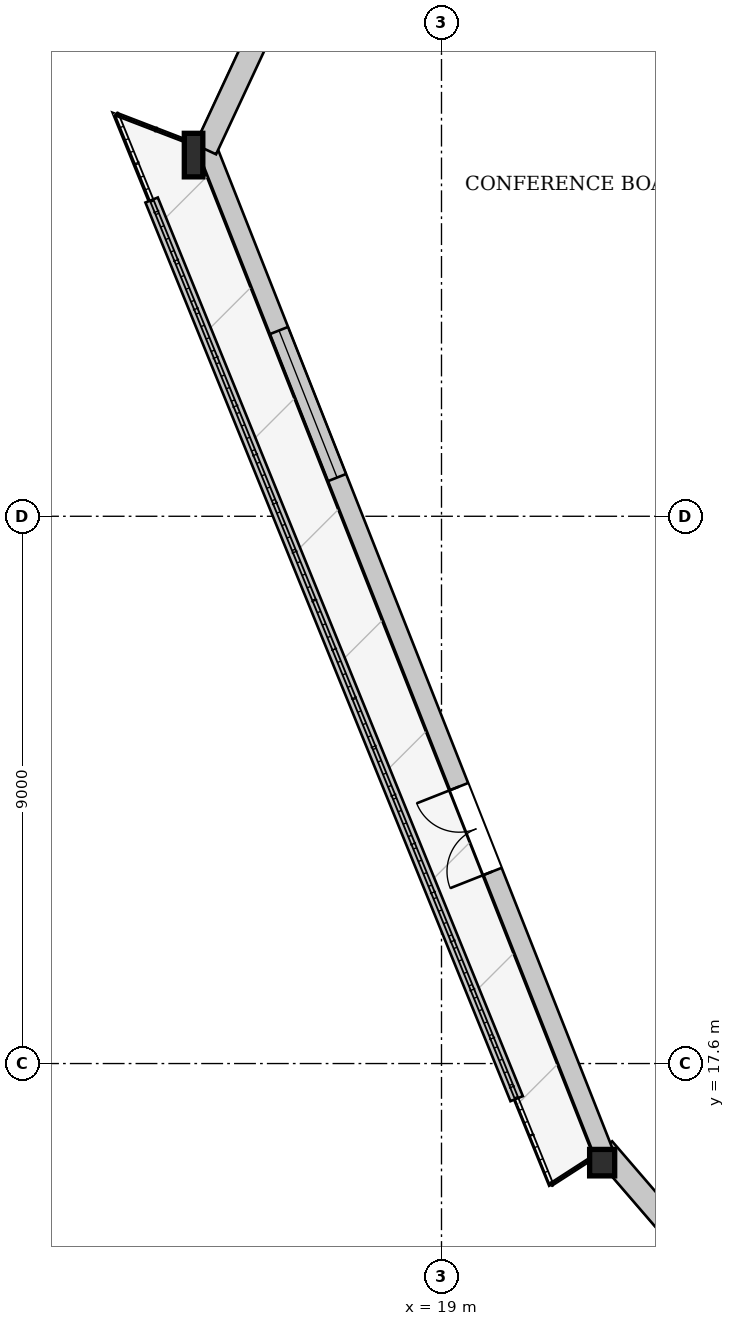
"""IFC4 building model, lengths in metres.
Left out: names, types, materials, properties, quantities, classifications, styles, units other than length and angle.
Written with IfcOpenShell. Run it as: python <this file> out.ifc"""

import sys

from ifc_helpers import new_model, si_unit, direction, frame, frame_2d, origin, origin_2d, place, context, subcontext, project, spatial, rectangle, i_section, extrude, source, transform, mapped, element, fill, save


model = new_model("IFC4")
c1 = context("Model", 3, precision=1e-05, world=origin(), true_north=direction((0.0, 1.0)))
c2 = subcontext(c1, "Body", "Model", "MODEL_VIEW")
j1 = project(units=[si_unit("LENGTHUNIT", "METRE"), si_unit("PLANEANGLEUNIT", "RADIAN")], contexts=[c1])
p1 = place(None, origin())
s1 = spatial("IfcSite", under=j1, at=p1, CompositionType="ELEMENT")
p2 = place(p1, origin())
s2 = spatial("IfcBuilding", under=s1, at=p2, CompositionType="ELEMENT")
p3 = place(p2, frame((0.0, 0.0, 167.9)))
s3 = spatial("IfcBuildingStorey", under=s2, at=p3, CompositionType="ELEMENT", Elevation=167.9)
m1 = source(origin(), c2, "Body", "SweptSolid", [
    extrude(i_section(OverallWidth=0.304, OverallDepth=0.716, WebThickness=0.021, FlangeThickness=0.04, at=origin_2d()), origin(), (0.0, 0.0, 1.0), 3.403),
])
p4 = place(p3, frame((14.948, 32.713, 0.0), z_axis=(-0.015065306338, -0.102013645775, 0.994668916082), x_axis=(0.989270592678, -0.146094813265, 0.0)))
e1 = element("IfcColumn", 1, at=p4, inside=s3, PredefinedType="COLUMN", context=c2, shape_type="MappedRepresentation", body=[
    mapped(m1, transform((0.0, 0.0, 0.0), x_axis=(1.0, 0.0, 0.0), y_axis=(0.0, 1.0, 0.0), z_axis=(0.0, 0.0, 1.0), scale=1.0)),
])
m2 = source(origin(), c2, "Body", "SweptSolid", [
    extrude(i_section(OverallWidth=0.412, OverallDepth=0.435, WebThickness=0.031, FlangeThickness=0.05, at=origin_2d()), origin(), (0.0, 0.0, 1.0), 3.4),
])
p5 = place(p3, frame((21.519, 16.073, 0.0), z_axis=(0.072518626015, -0.060743324365, 0.995515593763), x_axis=(0.642123433795, 0.766601262568, 0.0)))
e2 = element("IfcColumn", 2, at=p5, inside=s3, PredefinedType="COLUMN", context=c2, shape_type="MappedRepresentation", body=[
    mapped(m2, transform((0.0, 0.0, 0.0), x_axis=(1.0, 0.0, 0.0), y_axis=(0.0, 1.0, 0.0), z_axis=(0.0, 0.0, 1.0), scale=1.0)),
])
p6 = place(p3, frame((33.342, 2.646, 0.0), z_axis=(0.0, 0.0, 1.0), x_axis=(-0.652817593777, 0.757515141271, 0.0)))
e3 = element("IfcWall", 3, at=p6, inside=s3, PredefinedType="SOLIDWALL", context=c2, shape_type="SweptSolid", body=[
    extrude(rectangle(XDim=17.89, YDim=0.38, at=frame_2d((8.945, 0.0))), origin(), (0.0, 0.0, 1.0), 2.722),
])
p7 = place(p6, frame((3.909, 0.0, 0.352)))
e4 = element("IfcOpeningElement", 4, at=p7, cuts=e3, PredefinedType="OPENING", context=c2, shape_type="SweptSolid", body=[
    extrude(rectangle(XDim=2.2, YDim=2.25, at=frame_2d((1.1, 1.125))), frame((0.0, 0.2, 0.0), z_axis=(0.0, -1.0, 0.0), x_axis=(1.0, 0.0, 0.0)), (0.0, 0.0, 1.0), 0.4),
])
p8 = place(p6, frame((11.781, 0.0, 0.352)))
e5 = element("IfcOpeningElement", 5, at=p8, cuts=e3, PredefinedType="OPENING", context=c2, shape_type="SweptSolid", body=[
    extrude(rectangle(XDim=2.2, YDim=2.25, at=frame_2d((1.1, 1.125))), frame((0.0, 0.2, 0.0), z_axis=(0.0, -1.0, 0.0), x_axis=(1.0, 0.0, 0.0)), (0.0, 0.0, 1.0), 0.4),
])
p9 = place(p3, frame((21.668, 16.132, 0.0), z_axis=(0.0, 0.0, 1.0), x_axis=(-0.367279006452, 0.930110816741, 0.0)))
e6 = element("IfcWall", 6, at=p9, inside=s3, PredefinedType="SOLIDWALL", context=c2, shape_type="SweptSolid", body=[
    extrude(rectangle(XDim=17.89, YDim=0.32, at=frame_2d((8.945, 0.0))), origin(), (0.0, 0.0, 1.0), 2.722),
])
p10 = place(p9, frame((4.975, 0.0, 0.0)))
e7 = element("IfcOpeningElement", 7, at=p10, cuts=e6, PredefinedType="OPENING", context=c2, shape_type="SweptSolid", body=[
    extrude(rectangle(XDim=1.5, YDim=2.3, at=frame_2d((0.75, 1.15))), frame((0.0, 0.17, 0.0), z_axis=(0.0, -1.0, 0.0), x_axis=(1.0, 0.0, 0.0)), (0.0, 0.0, 1.0), 0.34),
])
p11 = place(p9, frame((11.939, 0.0, 0.252)))
e8 = element("IfcOpeningElement", 8, at=p11, cuts=e6, PredefinedType="OPENING", context=c2, shape_type="SweptSolid", body=[
    extrude(rectangle(XDim=2.6, YDim=2.35, at=frame_2d((1.3, 1.175))), frame((0.0, 0.17, 0.0), z_axis=(0.0, -1.0, 0.0), x_axis=(1.0, 0.0, 0.0)), (0.0, 0.0, 1.0), 0.34),
])
p12 = place(p3, frame((15.12, 32.633, 0.0), z_axis=(0.0, 0.0, 1.0), x_axis=(0.422584737529, 0.906323418878, 0.0)))
e9 = element("IfcWall", 9, at=p12, inside=s3, PredefinedType="SOLIDWALL", context=c2, shape_type="SweptSolid", body=[
    extrude(rectangle(XDim=4.667, YDim=0.38, at=frame_2d((2.333, 0.0))), origin(), (0.0, 0.0, 1.0), 2.722),
])
p13 = place(p3, frame((14.233, 31.801, 0.0), z_axis=(0.0, 0.0, 1.0), x_axis=(0.376362267413, -0.926472581174, 0.0)))
e10 = element("IfcWall", 10, at=p13, inside=s3, PredefinedType="PARAPET", context=c2, shape_type="SweptSolid", body=[
    extrude(rectangle(XDim=15.951, YDim=0.22, at=frame_2d((7.976, 0.0))), origin(), (0.0, 0.0, 1.0), 0.3),
])
m3 = source(origin(), c2, "Body", "SweptSolid", [
    extrude(rectangle(XDim=1.5, YDim=2.3, at=frame_2d((0.75, 1.15))), frame((0.0, 0.025, 0.0), z_axis=(0.0, -1.0, 0.0), x_axis=(1.0, 0.0, 0.0)), (0.0, 0.0, 1.0), 0.05),
])
p14 = place(p10, origin())
e11 = element("IfcDoor", 11, at=p14, inside=s3, OperationType="DOUBLE_DOOR_SINGLE_SWING", PredefinedType="DOOR", context=c2, shape_type="MappedRepresentation", body=[
    mapped(m3, transform((0.0, 0.0, 0.0), x_axis=(1.0, 0.0, 0.0), y_axis=(0.0, 1.0, 0.0), z_axis=(0.0, 0.0, 1.0), scale=1.0)),
])
fill(e7, e11)
m4 = source(origin(), c2, "Body", "SweptSolid", [
    extrude(rectangle(XDim=2.6, YDim=2.35, at=frame_2d((1.3, 1.175))), frame((0.0, 0.03, 0.0), z_axis=(0.0, -1.0, 0.0), x_axis=(1.0, 0.0, 0.0)), (0.0, 0.0, 1.0), 0.06),
])
p15 = place(p11, origin())
e12 = element("IfcWindow", 12, at=p15, inside=s3, PartitioningType="SINGLE_PANEL", PredefinedType="WINDOW", context=c2, shape_type="MappedRepresentation", body=[
    mapped(m4, transform((0.0, 0.0, 0.0), x_axis=(1.0, 0.0, 0.0), y_axis=(0.0, 1.0, 0.0), z_axis=(0.0, 0.0, 1.0), scale=1.0)),
])
fill(e8, e12)
save(model, sys.argv[1])
